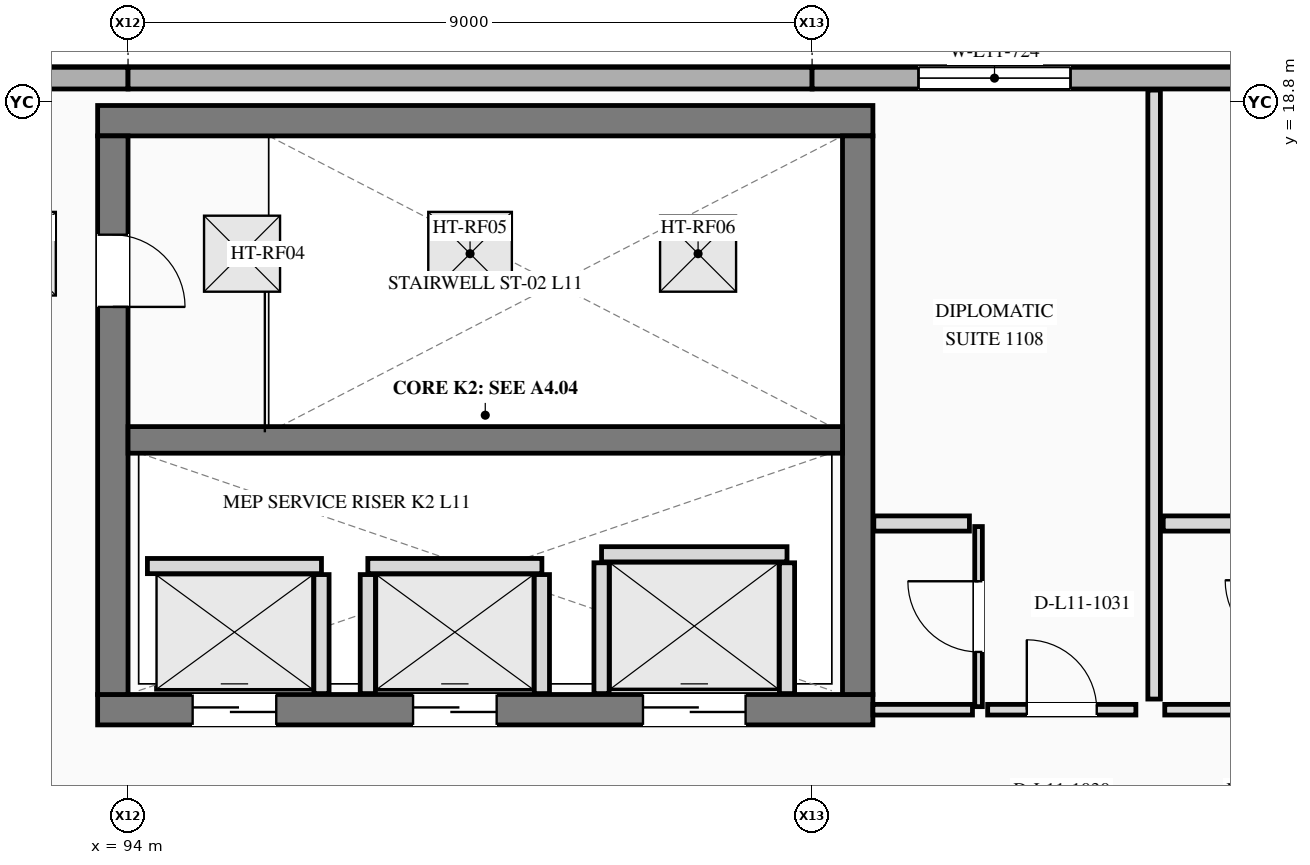
"""IFC4 building model, lengths in metres.
Left out: names, types, materials, properties, quantities, classifications, styles, units other than length and angle.
Written with IfcOpenShell. Run it as: python <this file> out.ifc"""

import sys

from ifc_helpers import new_model, si_unit, direction, frame, frame_2d, origin, origin_2d, place, context, subcontext, project, spatial, rectangle, extrude, element, fill, save


model = new_model("IFC4")
c1 = context("Model", 3, precision=1e-05, world=origin(), true_north=direction((0.0, 1.0)))
c2 = subcontext(c1, "Body", "Model", "MODEL_VIEW")
j1 = project(units=[si_unit("LENGTHUNIT", "METRE"), si_unit("PLANEANGLEUNIT", "RADIAN")], contexts=[c1])
p1 = place(None, origin())
s1 = spatial("IfcSite", under=j1, at=p1, CompositionType="ELEMENT")
p2 = place(p1, origin())
s2 = spatial("IfcBuilding", under=s1, at=p2, CompositionType="ELEMENT")
p3 = place(p2, frame((0.0, 0.0, 44.6)))
s3 = spatial("IfcBuildingStorey", under=s2, at=p3, CompositionType="ELEMENT", Elevation=44.6)
p4 = place(p3, frame((94.0, 19.11, 0.0), z_axis=(0.0, 0.0, 1.0), x_axis=(-1.0, 0.0, 0.0)))
e1 = element("IfcWall", 1, at=p4, inside=s3, PredefinedType="STANDARD", context=c2, shape_type="SweptSolid", body=[
    extrude(rectangle(XDim=9.31, YDim=0.285, at=frame_2d((4.655, 0.0))), origin(), (0.0, 0.0, 1.0), 3.6),
])
p5 = place(p3, frame((103.0, 19.11, 0.0), z_axis=(0.0, 0.0, 1.0), x_axis=(-1.0, 0.0, 0.0)))
e2 = element("IfcWall", 2, at=p5, inside=s3, PredefinedType="STANDARD", context=c2, shape_type="SweptSolid", body=[
    extrude(rectangle(XDim=9.0, YDim=0.285, at=frame_2d((4.5, 0.0))), origin(), (0.0, 0.0, 1.0), 3.6),
])
p6 = place(p3, frame((112.0, 19.11, 0.0), z_axis=(0.0, 0.0, 1.0), x_axis=(-1.0, 0.0, 0.0)))
e3 = element("IfcWall", 3, at=p6, inside=s3, PredefinedType="STANDARD", context=c2, shape_type="SweptSolid", body=[
    extrude(rectangle(XDim=9.0, YDim=0.285, at=frame_2d((4.5, 0.0))), origin(), (0.0, 0.0, 1.0), 3.6),
])
p7 = place(p6, frame((5.6, 0.0, 0.85)))
e4 = element("IfcOpeningElement", 4, at=p7, cuts=e3, PredefinedType="OPENING", context=c2, shape_type="SweptSolid", body=[
    extrude(rectangle(XDim=2.0, YDim=1.65, at=frame_2d((1.0, 0.825))), frame((0.0, 0.152, 0.0), z_axis=(0.0, -1.0, 0.0), x_axis=(1.0, 0.0, 0.0)), (0.0, 0.0, 1.0), 0.305),
])
p8 = place(p6, frame((1.4, 0.0, 0.85)))
e5 = element("IfcOpeningElement", 5, at=p8, cuts=e3, PredefinedType="OPENING", context=c2, shape_type="SweptSolid", body=[
    extrude(rectangle(XDim=2.0, YDim=1.65, at=frame_2d((1.0, 0.825))), frame((0.0, 0.152, 0.0), z_axis=(0.0, -1.0, 0.0), x_axis=(1.0, 0.0, 0.0)), (0.0, 0.0, 1.0), 0.305),
])
p9 = place(p3, frame((93.6, 10.8, 0.0), z_axis=(0.0, 0.0, 1.0), x_axis=(1.0, 0.0, 0.0)))
e6 = element("IfcWall", 6, at=p9, inside=s3, PredefinedType="SHEAR", context=c2, shape_type="SweptSolid", body=[
    extrude(rectangle(XDim=10.2, YDim=0.4, at=frame_2d((5.1, 0.0))), origin(), (0.0, 0.0, 1.0), 3.6),
])
p10 = place(p9, frame((1.25, 0.0, 0.0)))
e7 = element("IfcOpeningElement", 7, at=p10, cuts=e6, PredefinedType="OPENING", context=c2, shape_type="SweptSolid", body=[
    extrude(rectangle(XDim=1.1, YDim=2.2, at=frame_2d((0.55, 1.1))), frame((0.0, 0.21, 0.0), z_axis=(0.0, -1.0, 0.0), x_axis=(1.0, 0.0, 0.0)), (0.0, 0.0, 1.0), 0.42),
])
p11 = place(p9, frame((4.15, 0.0, 0.0)))
e8 = element("IfcOpeningElement", 8, at=p11, cuts=e6, PredefinedType="OPENING", context=c2, shape_type="SweptSolid", body=[
    extrude(rectangle(XDim=1.1, YDim=2.2, at=frame_2d((0.55, 1.1))), frame((0.0, 0.21, 0.0), z_axis=(0.0, -1.0, 0.0), x_axis=(1.0, 0.0, 0.0)), (0.0, 0.0, 1.0), 0.42),
])
p12 = place(p9, frame((7.175, 0.0, 0.0)))
e9 = element("IfcOpeningElement", 9, at=p12, cuts=e6, PredefinedType="OPENING", context=c2, shape_type="SweptSolid", body=[
    extrude(rectangle(XDim=1.35, YDim=2.3, at=frame_2d((0.675, 1.15))), frame((0.0, 0.21, 0.0), z_axis=(0.0, -1.0, 0.0), x_axis=(1.0, 0.0, 0.0)), (0.0, 0.0, 1.0), 0.42),
])
p13 = place(p3, frame((103.8, 18.55, 0.0), z_axis=(0.0, 0.0, 1.0), x_axis=(-1.0, 0.0, 0.0)))
e10 = element("IfcWall", 10, at=p13, inside=s3, PredefinedType="SHEAR", context=c2, shape_type="SweptSolid", body=[
    extrude(rectangle(XDim=10.2, YDim=0.4, at=frame_2d((5.1, 0.0))), origin(), (0.0, 0.0, 1.0), 3.6),
])
p14 = place(p3, frame((93.8, 18.35, 0.0), z_axis=(0.0, 0.0, 1.0), x_axis=(0.0, -1.0, 0.0)))
e11 = element("IfcWall", 11, at=p14, inside=s3, PredefinedType="SHEAR", context=c2, shape_type="SweptSolid", body=[
    extrude(rectangle(XDim=7.35, YDim=0.4, at=frame_2d((3.675, 0.0))), origin(), (0.0, 0.0, 1.0), 3.6),
])
p15 = place(p14, frame((1.3, 0.0, 0.0)))
e12 = element("IfcOpeningElement", 12, at=p15, cuts=e11, PredefinedType="OPENING", context=c2, shape_type="SweptSolid", body=[
    extrude(rectangle(XDim=0.95, YDim=2.2, at=frame_2d((0.475, 1.1))), frame((0.0, 0.21, 0.0), z_axis=(0.0, -1.0, 0.0), x_axis=(1.0, 0.0, 0.0)), (0.0, 0.0, 1.0), 0.42),
])
p16 = place(p3, frame((103.6, 11.0, 0.0), z_axis=(0.0, 0.0, 1.0), x_axis=(0.0, 1.0, 0.0)))
e13 = element("IfcWall", 13, at=p16, inside=s3, PredefinedType="SHEAR", context=c2, shape_type="SweptSolid", body=[
    extrude(rectangle(XDim=7.35, YDim=0.4, at=frame_2d((3.675, 0.0))), origin(), (0.0, 0.0, 1.0), 3.6),
])
p17 = place(p3, frame((94.0, 14.35, 0.0), z_axis=(0.0, 0.0, 1.0), x_axis=(1.0, 0.0, 0.0)))
e14 = element("IfcWall", 14, at=p17, inside=s3, PredefinedType="SHEAR", context=c2, shape_type="SweptSolid", body=[
    extrude(rectangle(XDim=9.4, YDim=0.35, at=frame_2d((4.7, 0.0))), origin(), (0.0, 0.0, 1.0), 3.6),
])
p18 = place(p3, frame((94.255, 12.69, 0.0), z_axis=(0.0, 0.0, 1.0), x_axis=(1.0, 0.0, 0.0)))
e15 = element("IfcWall", 15, at=p18, inside=s3, PredefinedType="PLUMBINGWALL", context=c2, shape_type="SweptSolid", body=[
    extrude(rectangle(XDim=2.29, YDim=0.2, at=frame_2d((1.145, 0.0))), origin(), (0.0, 0.0, 1.0), 3.3),
])
p19 = place(p3, frame((96.545, 11.012, 0.0), z_axis=(0.0, 0.0, 1.0), x_axis=(0.0, 1.0, 0.0)))
e16 = element("IfcWall", 16, at=p19, inside=s3, PredefinedType="PLUMBINGWALL", context=c2, shape_type="SweptSolid", body=[
    extrude(rectangle(XDim=1.566, YDim=0.2, at=frame_2d((0.783, 0.0))), origin(), (0.0, 0.0, 1.0), 3.3),
])
p20 = place(p3, frame((97.155, 12.69, 0.0), z_axis=(0.0, 0.0, 1.0), x_axis=(1.0, 0.0, 0.0)))
e17 = element("IfcWall", 17, at=p20, inside=s3, PredefinedType="PLUMBINGWALL", context=c2, shape_type="SweptSolid", body=[
    extrude(rectangle(XDim=2.29, YDim=0.2, at=frame_2d((1.145, 0.0))), origin(), (0.0, 0.0, 1.0), 3.3),
])
for number, where, z_axis, x_axis in (
    (18, (97.155, 11.012, 0.0), (0.0, 0.0, 1.0), (0.0, 1.0, 0.0)),
    (19, (99.445, 11.012, 0.0), (0.0, 0.0, 1.0), (0.0, 1.0, 0.0)),
):
    element("IfcWall", number, at=place(p3, frame(where, z_axis=z_axis, x_axis=x_axis)), inside=s3, PredefinedType="PLUMBINGWALL", context=c2, shape_type="SweptSolid", body=[
        extrude(rectangle(XDim=1.566, YDim=0.2, at=frame_2d((0.783, 0.0))), origin(), (0.0, 0.0, 1.0), 3.3),
    ])
p21 = place(p3, frame((100.23, 12.845, 0.0), z_axis=(0.0, 0.0, 1.0), x_axis=(1.0, 0.0, 0.0)))
e20 = element("IfcWall", 20, at=p21, inside=s3, PredefinedType="PLUMBINGWALL", context=c2, shape_type="SweptSolid", body=[
    extrude(rectangle(XDim=2.44, YDim=0.2, at=frame_2d((1.22, 0.0))), origin(), (0.0, 0.0, 1.0), 3.3),
])
for number, where, z_axis, x_axis in (
    (21, (100.23, 11.012, 0.0), (0.0, 0.0, 1.0), (0.0, 1.0, 0.0)),
    (22, (102.67, 11.012, 0.0), (0.0, 0.0, 1.0), (0.0, 1.0, 0.0)),
):
    element("IfcWall", number, at=place(p3, frame(where, z_axis=z_axis, x_axis=x_axis)), inside=s3, PredefinedType="PLUMBINGWALL", context=c2, shape_type="SweptSolid", body=[
        extrude(rectangle(XDim=1.721, YDim=0.2, at=frame_2d((0.86, 0.0))), origin(), (0.0, 0.0, 1.0), 3.3),
    ])
p22 = place(p3, frame((103.8, 10.8, 0.0), z_axis=(0.0, 0.0, 1.0), x_axis=(1.0, 0.0, 0.0)))
e23 = element("IfcWall", 23, at=p22, inside=s3, PredefinedType="PARTITIONING", context=c2, shape_type="SweptSolid", body=[
    extrude(rectangle(XDim=1.31, YDim=0.14, at=frame_2d((0.655, 0.0))), origin(), (0.0, 0.0, 1.0), 3.3),
])
p23 = place(p3, frame((105.31, 10.8, 0.0), z_axis=(0.0, 0.0, 1.0), x_axis=(1.0, 0.0, 0.0)))
e24 = element("IfcWall", 24, at=p23, inside=s3, PredefinedType="PARTITIONING", context=c2, shape_type="SweptSolid", body=[
    extrude(rectangle(XDim=1.95, YDim=0.14, at=frame_2d((0.975, 0.0))), origin(), (0.0, 0.0, 1.0), 3.3),
])
p24 = place(p23, frame((0.515, 0.0, 0.0)))
e25 = element("IfcOpeningElement", 25, at=p24, cuts=e24, PredefinedType="OPENING", context=c2, shape_type="SweptSolid", body=[
    extrude(rectangle(XDim=0.92, YDim=2.3, at=frame_2d((0.46, 1.15))), frame((0.0, 0.08, 0.0), z_axis=(0.0, -1.0, 0.0), x_axis=(1.0, 0.0, 0.0)), (0.0, 0.0, 1.0), 0.16),
])
p25 = place(p3, frame((107.5, 10.94, 0.0), z_axis=(0.0, 0.0, 1.0), x_axis=(0.0, 1.0, 0.0)))
e26 = element("IfcWall", 26, at=p25, inside=s3, PredefinedType="PARTITIONING", context=c2, shape_type="SweptSolid", body=[
    extrude(rectangle(XDim=8.012, YDim=0.165, at=frame_2d((4.006, 0.0))), origin(), (0.0, 0.0, 1.0), 3.3),
])
p26 = place(p3, frame((105.19, 10.84, 0.0), z_axis=(0.0, 0.0, 1.0), x_axis=(0.0, 1.0, 0.0)))
e27 = element("IfcWall", 27, at=p26, inside=s3, PredefinedType="PARTITIONING", context=c2, shape_type="SweptSolid", body=[
    extrude(rectangle(XDim=2.37, YDim=0.1, at=frame_2d((1.185, 0.0))), origin(), (0.0, 0.0, 1.0), 3.3),
])
p27 = place(p26, frame((0.72, 0.0, 0.0)))
e28 = element("IfcOpeningElement", 28, at=p27, cuts=e27, PredefinedType="OPENING", context=c2, shape_type="SweptSolid", body=[
    extrude(rectangle(XDim=0.93, YDim=2.14, at=frame_2d((0.465, 1.07))), frame((0.0, 0.06, 0.0), z_axis=(0.0, -1.0, 0.0), x_axis=(1.0, 0.0, 0.0)), (0.0, 0.0, 1.0), 0.12),
])
p28 = place(p3, frame((103.812, 13.25, 0.0), z_axis=(0.0, 0.0, 1.0), x_axis=(1.0, 0.0, 0.0)))
e29 = element("IfcWall", 29, at=p28, inside=s3, PredefinedType="PLUMBINGWALL", context=c2, shape_type="SweptSolid", body=[
    extrude(rectangle(XDim=1.258, YDim=0.2, at=frame_2d((0.629, 0.0))), origin(), (0.0, 0.0, 1.0), 3.3),
])
p29 = place(p3, frame((107.64, 10.8, 0.0), z_axis=(0.0, 0.0, 1.0), x_axis=(1.0, 0.0, 0.0)))
e30 = element("IfcWall", 30, at=p29, inside=s3, PredefinedType="PARTITIONING", context=c2, shape_type="SweptSolid", body=[
    extrude(rectangle(XDim=1.67, YDim=0.14, at=frame_2d((0.835, 0.0))), origin(), (0.0, 0.0, 1.0), 3.3),
])
p30 = place(p3, frame((107.62, 13.25, 0.0), z_axis=(0.0, 0.0, 1.0), x_axis=(1.0, 0.0, 0.0)))
e31 = element("IfcWall", 31, at=p30, inside=s3, PredefinedType="PLUMBINGWALL", context=c2, shape_type="SweptSolid", body=[
    extrude(rectangle(XDim=1.65, YDim=0.2, at=frame_2d((0.825, 0.0))), origin(), (0.0, 0.0, 1.0), 3.3),
])
p31 = place(p7, origin())
e32 = element("IfcWindow", 32, at=p31, inside=s3, PartitioningType="SINGLE_PANEL", PredefinedType="WINDOW", context=c2, shape_type="SweptSolid", body=[
    extrude(rectangle(XDim=2.0, YDim=1.65, at=frame_2d((1.0, 0.825))), frame((0.0, 0.03, 0.0), z_axis=(0.0, -1.0, 0.0), x_axis=(1.0, 0.0, 0.0)), (0.0, 0.0, 1.0), 0.06),
])
fill(e4, e32)
p32 = place(p2, frame((0.0, 0.0, 48.2)))
p33 = place(p32, origin())
p34 = place(p33, frame((92.5, 16.8, -0.01)))
p35 = place(p34, frame((0.0, 0.0, 0.095)))
e33 = element("IfcDoor", 33, at=p35, inside=s3, OperationType="SINGLE_SWING_LEFT", PredefinedType="TRAPDOOR", context=c2, shape_type="SweptSolid", body=[
    extrude(rectangle(XDim=1.1, YDim=1.1, at=origin_2d()), origin(), (0.0, 0.0, 1.0), 0.05),
])
p36 = place(p33, frame((95.5, 16.8, -0.01)))
p37 = place(p36, frame((0.0, 0.0, 0.095)))
e34 = element("IfcDoor", 34, at=p37, inside=s3, OperationType="SINGLE_SWING_LEFT", PredefinedType="TRAPDOOR", context=c2, shape_type="SweptSolid", body=[
    extrude(rectangle(XDim=1.0, YDim=1.0, at=origin_2d()), origin(), (0.0, 0.0, 1.0), 0.05),
])
p38 = place(p33, frame((98.5, 16.8, -0.01)))
p39 = place(p38, frame((0.0, 0.0, 0.095)))
e35 = element("IfcDoor", 35, at=p39, inside=s3, OperationType="SINGLE_SWING_LEFT", PredefinedType="TRAPDOOR", context=c2, shape_type="SweptSolid", body=[
    extrude(rectangle(XDim=1.1, YDim=1.1, at=origin_2d()), origin(), (0.0, 0.0, 1.0), 0.05),
])
p40 = place(p33, frame((101.5, 16.8, -0.01)))
p41 = place(p40, frame((0.0, 0.0, 0.095)))
e36 = element("IfcDoor", 36, at=p41, inside=s3, OperationType="SINGLE_SWING_LEFT", PredefinedType="TRAPDOOR", context=c2, shape_type="SweptSolid", body=[
    extrude(rectangle(XDim=1.0, YDim=1.0, at=origin_2d()), origin(), (0.0, 0.0, 1.0), 0.05),
])
p42 = place(p15, origin())
e37 = element("IfcDoor", 37, at=p42, inside=s3, OperationType="SINGLE_SWING_RIGHT", PredefinedType="DOOR", context=c2, shape_type="SweptSolid", body=[
    extrude(rectangle(XDim=0.95, YDim=2.2, at=frame_2d((0.475, 1.1))), frame((0.0, 0.025, 0.0), z_axis=(0.0, -1.0, 0.0), x_axis=(1.0, 0.0, 0.0)), (0.0, 0.0, 1.0), 0.05),
])
fill(e12, e37)
p43 = place(p10, origin())
e38 = element("IfcDoor", 38, at=p43, inside=s3, OperationType="SLIDING_TO_LEFT", PredefinedType="DOOR", context=c2, shape_type="SweptSolid", body=[
    extrude(rectangle(XDim=1.1, YDim=2.2, at=frame_2d((0.55, 1.1))), frame((0.0, 0.025, 0.0), z_axis=(0.0, -1.0, 0.0), x_axis=(1.0, 0.0, 0.0)), (0.0, 0.0, 1.0), 0.05),
])
fill(e7, e38)
p44 = place(p11, origin())
e39 = element("IfcDoor", 39, at=p44, inside=s3, OperationType="SLIDING_TO_RIGHT", PredefinedType="DOOR", context=c2, shape_type="SweptSolid", body=[
    extrude(rectangle(XDim=1.1, YDim=2.2, at=frame_2d((0.55, 1.1))), frame((0.0, 0.025, 0.0), z_axis=(0.0, -1.0, 0.0), x_axis=(1.0, 0.0, 0.0)), (0.0, 0.0, 1.0), 0.05),
])
fill(e8, e39)
p45 = place(p12, origin())
e40 = element("IfcDoor", 40, at=p45, inside=s3, OperationType="SLIDING_TO_LEFT", PredefinedType="DOOR", context=c2, shape_type="SweptSolid", body=[
    extrude(rectangle(XDim=1.35, YDim=2.3, at=frame_2d((0.675, 1.15))), frame((0.0, 0.025, 0.0), z_axis=(0.0, -1.0, 0.0), x_axis=(1.0, 0.0, 0.0)), (0.0, 0.0, 1.0), 0.05),
])
fill(e9, e40)
p46 = place(p24, origin())
e41 = element("IfcDoor", 41, at=p46, inside=s3, OperationType="SINGLE_SWING_LEFT", PredefinedType="DOOR", context=c2, shape_type="SweptSolid", body=[
    extrude(rectangle(XDim=0.92, YDim=2.3, at=frame_2d((0.46, 1.15))), frame((0.0, 0.025, 0.0), z_axis=(0.0, -1.0, 0.0), x_axis=(1.0, 0.0, 0.0)), (0.0, 0.0, 1.0), 0.05),
])
fill(e25, e41)
p47 = place(p27, origin())
e42 = element("IfcDoor", 42, at=p47, inside=s3, OperationType="SINGLE_SWING_RIGHT", PredefinedType="DOOR", context=c2, shape_type="SweptSolid", body=[
    extrude(rectangle(XDim=0.93, YDim=2.14, at=frame_2d((0.465, 1.07))), frame((0.0, 0.025, 0.0), z_axis=(0.0, -1.0, 0.0), x_axis=(1.0, 0.0, 0.0)), (0.0, 0.0, 1.0), 0.05),
])
fill(e28, e42)
save(model, sys.argv[1])
